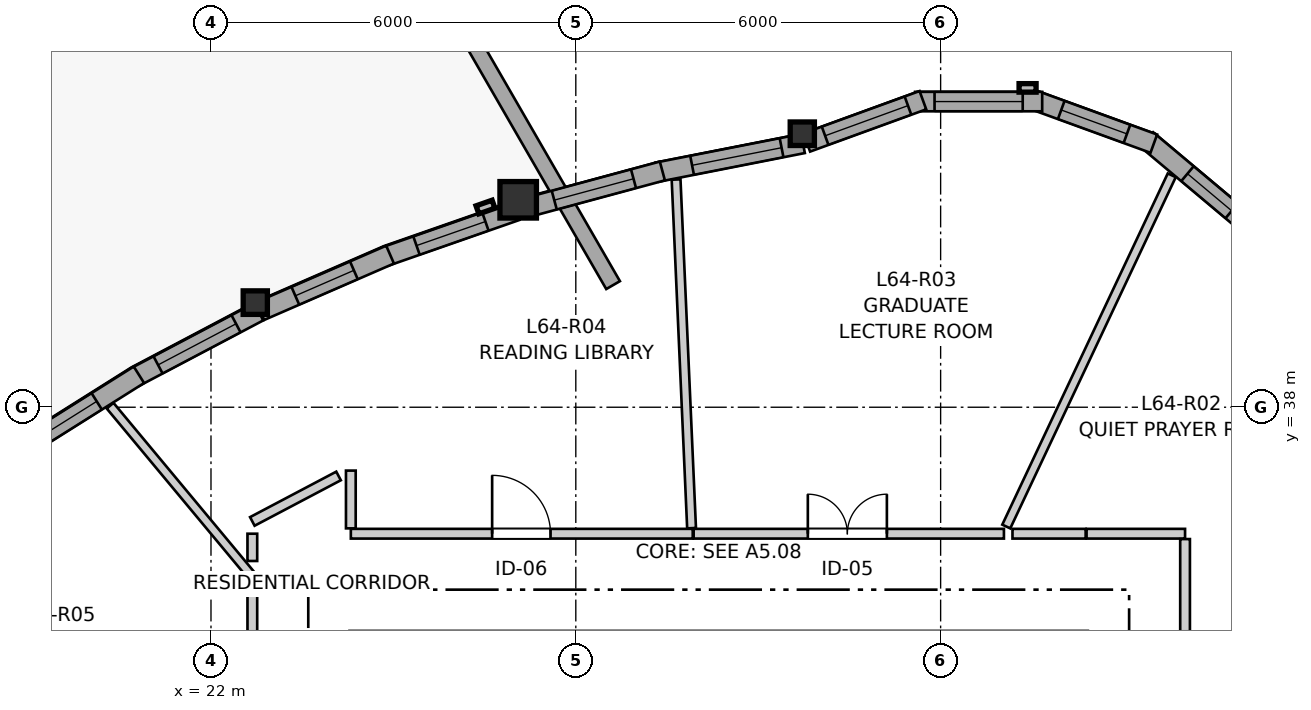
"""IFC4 building model, lengths in metres.
Left out: names, types, materials, properties, quantities, classifications, styles, units other than length and angle.
Written with IfcOpenShell. Run it as: python <this file> out.ifc"""

import sys

from ifc_helpers import new_model, si_unit, direction, frame, frame_2d, origin, origin_2d, place, context, subcontext, project, spatial, rectangle, i_section, extrude, source, transform, mapped, element, fill, save


model = new_model("IFC4")
c1 = context("Model", 3, precision=1e-05, world=origin(), true_north=direction((0.0, 1.0)))
c2 = subcontext(c1, "Body", "Model", "MODEL_VIEW")
j1 = project(units=[si_unit("LENGTHUNIT", "METRE"), si_unit("PLANEANGLEUNIT", "RADIAN")], contexts=[c1])
p1 = place(None, origin())
s1 = spatial("IfcSite", under=j1, at=p1, CompositionType="ELEMENT")
p2 = place(p1, origin())
s2 = spatial("IfcBuilding", under=s1, at=p2, CompositionType="ELEMENT")
p3 = place(p2, frame((0.0, 0.0, 214.8)))
s3 = spatial("IfcBuildingStorey", under=s2, at=p3, CompositionType="ELEMENT", Elevation=214.8)
m1 = source(origin(), c2, "Body", "SweptSolid", [
    extrude(i_section(OverallWidth=0.398, OverallDepth=0.387, WebThickness=0.019, FlangeThickness=0.03, FilletRadius=0.015, at=origin_2d()), origin(), (0.0, 0.0, 1.0), 2.96),
])
p4 = place(p3, frame((31.725, 42.498, 0.0), z_axis=(0.0, 0.0, 1.0), x_axis=(1.0, 0.0, 0.0)))
e1 = element("IfcColumn", 1, at=p4, inside=s3, PredefinedType="PILASTER", context=c2, shape_type="MappedRepresentation", body=[
    mapped(m1, transform((0.0, 0.0, 0.0), x_axis=(1.0, 0.0, 0.0), y_axis=(0.0, 1.0, 0.0), z_axis=(0.0, 0.0, 1.0), scale=1.0)),
])
m2 = source(origin(), c2, "Body", "SweptSolid", [
    extrude(rectangle(XDim=0.6, YDim=0.6, at=origin_2d()), origin(), (0.0, 0.0, 1.0), 2.96),
])
p5 = place(p3, frame((27.052, 41.411, 0.0), z_axis=(0.0, 0.0, 1.0), x_axis=(1.0, 0.0, 0.0)))
e2 = element("IfcColumn", 2, at=p5, inside=s3, PredefinedType="COLUMN", context=c2, shape_type="MappedRepresentation", body=[
    mapped(m2, transform((0.0, 0.0, 0.0), x_axis=(1.0, 0.0, 0.0), y_axis=(0.0, 1.0, 0.0), z_axis=(0.0, 0.0, 1.0), scale=1.0)),
])
p6 = place(p3, frame((22.729, 39.72, 0.0), z_axis=(0.0, 0.0, 1.0), x_axis=(1.0, 0.0, 0.0)))
e3 = element("IfcColumn", 3, at=p6, inside=s3, PredefinedType="PILASTER", context=c2, shape_type="MappedRepresentation", body=[
    mapped(m1, transform((0.0, 0.0, 0.0), x_axis=(1.0, 0.0, 0.0), y_axis=(0.0, 1.0, 0.0), z_axis=(0.0, 0.0, 1.0), scale=1.0)),
])
p7 = place(p3, frame((28.613, 40.008, 0.0), z_axis=(0.0, 0.0, 1.0), x_axis=(-0.49999213116, 0.866029946814, 0.0)))
e4 = element("IfcWall", 4, at=p7, inside=s3, PredefinedType="PARAPET", context=c2, shape_type="SweptSolid", body=[
    extrude(rectangle(XDim=20.349, YDim=0.26, at=frame_2d((10.174, 0.0))), origin(), (0.0, 0.0, 1.0), 0.55),
])
p8 = place(p3, frame((38.994, 41.056, 0.0), z_axis=(0.0, 0.0, 1.0), x_axis=(-0.766024572719, 0.642811289563, 0.0)))
e5 = element("IfcWall", 5, at=p8, inside=s3, PredefinedType="SOLIDWALL", context=c2, shape_type="SweptSolid", body=[
    extrude(rectangle(XDim=2.09, YDim=0.32, at=frame_2d((1.045, 0.0))), origin(), (0.0, 0.0, 1.0), 2.58),
])
p9 = place(p8, frame((0.271, 0.0, 0.82)))
e6 = element("IfcOpeningElement", 6, at=p9, cuts=e5, PredefinedType="OPENING", context=c2, shape_type="SweptSolid", body=[
    extrude(rectangle(XDim=0.95, YDim=1.35, at=frame_2d((0.475, 0.675))), frame((0.0, 0.17, 0.0), z_axis=(0.0, -1.0, 0.0), x_axis=(1.0, 0.0, 0.0)), (0.0, 0.0, 1.0), 0.34),
])
p10 = place(p3, frame((37.506, 42.334, 0.0), z_axis=(0.0, 0.0, 1.0), x_axis=(-0.939711556618, 0.341968113072, 0.0)))
e7 = element("IfcWall", 7, at=p10, inside=s3, PredefinedType="SOLIDWALL", context=c2, shape_type="SweptSolid", body=[
    extrude(rectangle(XDim=2.09, YDim=0.32, at=frame_2d((1.045, 0.0))), origin(), (0.0, 0.0, 1.0), 2.58),
])
p11 = place(p10, frame((0.47, 0.0, 0.82)))
e8 = element("IfcOpeningElement", 8, at=p11, cuts=e7, PredefinedType="OPENING", context=c2, shape_type="SweptSolid", body=[
    extrude(rectangle(XDim=1.15, YDim=1.2, at=frame_2d((0.575, 0.6))), frame((0.0, 0.17, 0.0), z_axis=(0.0, -1.0, 0.0), x_axis=(1.0, 0.0, 0.0)), (0.0, 0.0, 1.0), 0.34),
])
p12 = place(p3, frame((35.67, 43.027, 0.0), z_axis=(0.0, 0.0, 1.0), x_axis=(-1.0, 0.0, 0.0)))
e9 = element("IfcWall", 9, at=p12, inside=s3, PredefinedType="SOLIDWALL", context=c2, shape_type="SweptSolid", body=[
    extrude(rectangle(XDim=2.09, YDim=0.32, at=frame_2d((1.045, 0.0))), origin(), (0.0, 0.0, 1.0), 2.58),
])
p13 = place(p12, frame((0.32, 0.0, 0.82)))
e10 = element("IfcOpeningElement", 10, at=p13, cuts=e9, PredefinedType="OPENING", context=c2, shape_type="SweptSolid", body=[
    extrude(rectangle(XDim=1.45, YDim=1.25, at=frame_2d((0.725, 0.625))), frame((0.0, 0.17, 0.0), z_axis=(0.0, -1.0, 0.0), x_axis=(1.0, 0.0, 0.0)), (0.0, 0.0, 1.0), 0.34),
])
p14 = place(p3, frame((33.708, 43.049, 0.0), z_axis=(0.0, 0.0, 1.0), x_axis=(-0.939691662178, -0.342022777067, 0.0)))
e11 = element("IfcWall", 11, at=p14, inside=s3, PredefinedType="SOLIDWALL", context=c2, shape_type="SweptSolid", body=[
    extrude(rectangle(XDim=2.032, YDim=0.32, at=frame_2d((1.016, 0.0))), origin(), (0.0, 0.0, 1.0), 2.58),
])
p15 = place(p14, frame((0.261, 0.0, 0.82)))
e12 = element("IfcOpeningElement", 12, at=p15, cuts=e11, PredefinedType="OPENING", context=c2, shape_type="SweptSolid", body=[
    extrude(rectangle(XDim=1.45, YDim=1.25, at=frame_2d((0.725, 0.625))), frame((0.0, 0.17, 0.0), z_axis=(0.0, -1.0, 0.0), x_axis=(1.0, 0.0, 0.0)), (0.0, 0.0, 1.0), 0.34),
])
p16 = place(p3, frame((31.736, 42.337, 0.0), z_axis=(0.0, 0.0, 1.0), x_axis=(-0.981228566979, -0.192848384345, 0.0)))
e13 = element("IfcWall", 13, at=p16, inside=s3, PredefinedType="SOLIDWALL", context=c2, shape_type="SweptSolid", body=[
    extrude(rectangle(XDim=2.443, YDim=0.32, at=frame_2d((1.222, 0.0))), origin(), (0.0, 0.0, 1.0), 2.58),
])
p17 = place(p16, frame((0.359, 0.0, 0.82)))
e14 = element("IfcOpeningElement", 14, at=p17, cuts=e13, PredefinedType="OPENING", context=c2, shape_type="SweptSolid", body=[
    extrude(rectangle(XDim=1.5, YDim=1.45, at=frame_2d((0.75, 0.725))), frame((0.0, 0.17, 0.0), z_axis=(0.0, -1.0, 0.0), x_axis=(1.0, 0.0, 0.0)), (0.0, 0.0, 1.0), 0.34),
])
p18 = place(p3, frame((29.424, 41.885, 0.0), z_axis=(0.0, 0.0, 1.0), x_axis=(-0.965461343217, -0.260546338976, 0.0)))
e15 = element("IfcWall", 15, at=p18, inside=s3, PredefinedType="SOLIDWALL", context=c2, shape_type="SweptSolid", body=[
    extrude(rectangle(XDim=2.323, YDim=0.32, at=frame_2d((1.162, 0.0))), origin(), (0.0, 0.0, 1.0), 2.58),
])
p19 = place(p18, frame((0.491, 0.0, 0.82)))
e16 = element("IfcOpeningElement", 16, at=p19, cuts=e15, PredefinedType="OPENING", context=c2, shape_type="SweptSolid", body=[
    extrude(rectangle(XDim=1.35, YDim=1.45, at=frame_2d((0.675, 0.725))), frame((0.0, 0.17, 0.0), z_axis=(0.0, -1.0, 0.0), x_axis=(1.0, 0.0, 0.0)), (0.0, 0.0, 1.0), 0.34),
])
p20 = place(p3, frame((27.02, 41.23, 0.0), z_axis=(0.0, 0.0, 1.0), x_axis=(-0.944142960918, -0.329536142705, 0.0)))
e17 = element("IfcWall", 17, at=p20, inside=s3, PredefinedType="SOLIDWALL", context=c2, shape_type="SweptSolid", body=[
    extrude(rectangle(XDim=2.284, YDim=0.32, at=frame_2d((1.142, 0.0))), origin(), (0.0, 0.0, 1.0), 2.58),
])
p21 = place(p20, frame((0.537, 0.0, 0.82)))
e18 = element("IfcOpeningElement", 18, at=p21, cuts=e17, PredefinedType="OPENING", context=c2, shape_type="SweptSolid", body=[
    extrude(rectangle(XDim=1.2, YDim=1.45, at=frame_2d((0.6, 0.725))), frame((0.0, 0.17, 0.0), z_axis=(0.0, -1.0, 0.0), x_axis=(1.0, 0.0, 0.0)), (0.0, 0.0, 1.0), 0.34),
])
p22 = place(p3, frame((24.945, 40.51, 0.0), z_axis=(0.0, 0.0, 1.0), x_axis=(-0.917060051629, -0.39874912126, 0.0)))
e19 = element("IfcWall", 19, at=p22, inside=s3, PredefinedType="SOLIDWALL", context=c2, shape_type="SweptSolid", body=[
    extrude(rectangle(XDim=2.328, YDim=0.32, at=frame_2d((1.164, 0.0))), origin(), (0.0, 0.0, 1.0), 2.58),
])
p23 = place(p22, frame((0.649, 0.0, 0.82)))
e20 = element("IfcOpeningElement", 20, at=p23, cuts=e19, PredefinedType="OPENING", context=c2, shape_type="SweptSolid", body=[
    extrude(rectangle(XDim=1.05, YDim=1.45, at=frame_2d((0.525, 0.725))), frame((0.0, 0.17, 0.0), z_axis=(0.0, -1.0, 0.0), x_axis=(1.0, 0.0, 0.0)), (0.0, 0.0, 1.0), 0.34),
])
p24 = place(p3, frame((22.785, 39.57, 0.0), z_axis=(0.0, 0.0, 1.0), x_axis=(-0.884379914657, -0.466767786541, 0.0)))
e21 = element("IfcWall", 21, at=p24, inside=s3, PredefinedType="SOLIDWALL", context=c2, shape_type="SweptSolid", body=[
    extrude(rectangle(XDim=2.314, YDim=0.32, at=frame_2d((1.157, 0.0))), origin(), (0.0, 0.0, 1.0), 2.58),
])
p25 = place(p24, frame((0.422, 0.0, 0.82)))
e22 = element("IfcOpeningElement", 22, at=p25, cuts=e21, PredefinedType="OPENING", context=c2, shape_type="SweptSolid", body=[
    extrude(rectangle(XDim=1.45, YDim=1.25, at=frame_2d((0.725, 0.625))), frame((0.0, 0.17, 0.0), z_axis=(0.0, -1.0, 0.0), x_axis=(1.0, 0.0, 0.0)), (0.0, 0.0, 1.0), 0.34),
])
p26 = place(p3, frame((20.815, 38.533, 0.0), z_axis=(0.0, 0.0, 1.0), x_axis=(-0.846418054627, -0.532518991963, 0.0)))
e23 = element("IfcWall", 23, at=p26, inside=s3, PredefinedType="SOLIDWALL", context=c2, shape_type="SweptSolid", body=[
    extrude(rectangle(XDim=2.245, YDim=0.32, at=frame_2d((1.122, 0.0))), origin(), (0.0, 0.0, 1.0), 2.58),
])
p27 = place(p26, frame((0.82, 0.0, 0.82)))
e24 = element("IfcOpeningElement", 24, at=p27, cuts=e23, PredefinedType="OPENING", context=c2, shape_type="SweptSolid", body=[
    extrude(rectangle(XDim=1.05, YDim=1.45, at=frame_2d((0.525, 0.725))), frame((0.0, 0.17, 0.0), z_axis=(0.0, -1.0, 0.0), x_axis=(1.0, 0.0, 0.0)), (0.0, 0.0, 1.0), 0.34),
])
p28 = place(p3, frame((24.3, 35.92, 0.0), z_axis=(0.0, 0.0, 1.0), x_axis=(1.0, 0.0, 0.0)))
e25 = element("IfcWall", 25, at=p28, inside=s3, PredefinedType="PARTITIONING", context=c2, shape_type="SweptSolid", body=[
    extrude(rectangle(XDim=5.623, YDim=0.16, at=frame_2d((2.812, 0.0))), origin(), (0.0, 0.0, 1.0), 2.96),
])
p29 = place(p28, frame((2.324, 0.0, 0.0)))
e26 = element("IfcOpeningElement", 26, at=p29, cuts=e25, PredefinedType="OPENING", context=c2, shape_type="SweptSolid", body=[
    extrude(rectangle(XDim=0.96, YDim=2.1, at=frame_2d((0.48, 1.05))), frame((0.0, 0.09, 0.0), z_axis=(0.0, -1.0, 0.0), x_axis=(1.0, 0.0, 0.0)), (0.0, 0.0, 1.0), 0.18),
])
p30 = place(p3, frame((29.938, 35.92, 0.0), z_axis=(0.0, 0.0, 1.0), x_axis=(1.0, 0.0, 0.0)))
e27 = element("IfcWall", 27, at=p30, inside=s3, PredefinedType="PARTITIONING", context=c2, shape_type="SweptSolid", body=[
    extrude(rectangle(XDim=5.103, YDim=0.16, at=frame_2d((2.552, 0.0))), origin(), (0.0, 0.0, 1.0), 2.628),
])
p31 = place(p30, frame((1.878, 0.0, 0.0)))
e28 = element("IfcOpeningElement", 28, at=p31, cuts=e27, PredefinedType="OPENING", context=c2, shape_type="SweptSolid", body=[
    extrude(rectangle(XDim=1.3, YDim=2.1, at=frame_2d((0.65, 1.05))), frame((0.0, 0.09, 0.0), z_axis=(0.0, -1.0, 0.0), x_axis=(1.0, 0.0, 0.0)), (0.0, 0.0, 1.0), 0.18),
])
p32 = place(p3, frame((35.08, 36.038, 0.0), z_axis=(0.0, 0.0, 1.0), x_axis=(0.426214985607, 0.904621902258, 0.0)))
e29 = element("IfcWall", 29, at=p32, inside=s3, PredefinedType="PARTITIONING", context=c2, shape_type="SweptSolid", body=[
    extrude(rectangle(XDim=6.385, YDim=0.145, at=frame_2d((3.192, 0.0))), origin(), (0.0, 0.0, 1.0), 2.96),
])
p33 = place(p3, frame((29.649, 41.745, 0.0), z_axis=(0.0, 0.0, 1.0), x_axis=(0.044327022296, -0.999017074476, 0.0)))
e30 = element("IfcWall", 30, at=p33, inside=s3, PredefinedType="PARTITIONING", context=c2, shape_type="SweptSolid", body=[
    extrude(rectangle(XDim=5.739, YDim=0.145, at=frame_2d((2.87, 0.0))), origin(), (0.0, 0.0, 1.0), 2.96),
])
p34 = place(p3, frame((20.341, 38.025, 0.0), z_axis=(0.0, 0.0, 1.0), x_axis=(0.639731122463, -0.768598784121, 0.0)))
e31 = element("IfcWall", 31, at=p34, inside=s3, PredefinedType="PARTITIONING", context=c2, shape_type="SweptSolid", body=[
    extrude(rectangle(XDim=3.656, YDim=0.145, at=frame_2d((1.828, 0.0))), origin(), (0.0, 0.0, 1.0), 2.96),
])
p35 = place(p3, frame((36.4, 35.92, 0.0), z_axis=(0.0, 0.0, 1.0), x_axis=(1.0, 0.0, 0.0)))
e32 = element("IfcWall", 32, at=p35, inside=s3, PredefinedType="PARTITIONING", context=c2, shape_type="SweptSolid", body=[
    extrude(rectangle(XDim=1.62, YDim=0.16, at=frame_2d((0.81, 0.0))), origin(), (0.0, 0.0, 1.0), 2.96),
])
p36 = place(p3, frame((38.02, 34.315, 0.0), z_axis=(0.0, 0.0, 1.0), x_axis=(0.0, 1.0, 0.0)))
e33 = element("IfcWall", 33, at=p36, inside=s3, PredefinedType="PARTITIONING", context=c2, shape_type="SweptSolid", body=[
    extrude(rectangle(XDim=1.517, YDim=0.16, at=frame_2d((0.759, 0.0))), origin(), (0.0, 0.0, 1.0), 2.628),
])
p37 = place(p3, frame((22.68, 36.122, 0.0), z_axis=(0.0, 0.0, 1.0), x_axis=(0.884468554818, 0.466599802335, 0.0)))
e34 = element("IfcWall", 34, at=p37, inside=s3, PredefinedType="PARTITIONING", context=c2, shape_type="SweptSolid", body=[
    extrude(rectangle(XDim=1.603, YDim=0.16, at=frame_2d((0.802, 0.0))), origin(), (0.0, 0.0, 1.0), 2.96),
])
p38 = place(p3, frame((35.182, 35.92, 0.0), z_axis=(0.0, 0.0, 1.0), x_axis=(1.0, 0.0, 0.0)))
e35 = element("IfcWall", 35, at=p38, inside=s3, PredefinedType="PARTITIONING", context=c2, shape_type="SweptSolid", body=[
    extrude(rectangle(XDim=1.203, YDim=0.16, at=frame_2d((0.602, 0.0))), origin(), (0.0, 0.0, 1.0), 2.96),
])
p39 = place(p3, frame((24.3, 36.008, 0.0), z_axis=(0.0, 0.0, 1.0), x_axis=(0.0, 1.0, 0.0)))
e36 = element("IfcWall", 36, at=p39, inside=s3, PredefinedType="PARTITIONING", context=c2, shape_type="SweptSolid", body=[
    extrude(rectangle(XDim=0.95, YDim=0.16, at=frame_2d((0.475, 0.0))), origin(), (0.0, 0.0, 1.0), 2.96),
])
p40 = place(p3, frame((22.68, 34.315, 0.0), z_axis=(0.0, 0.0, 1.0), x_axis=(0.0, 1.0, 0.0)))
e37 = element("IfcWall", 37, at=p40, inside=s3, PredefinedType="PARTITIONING", context=c2, shape_type="SweptSolid", body=[
    extrude(rectangle(XDim=0.707, YDim=0.16, at=frame_2d((0.353, 0.0))), origin(), (0.0, 0.0, 1.0), 2.96),
])
p41 = place(p3, frame((22.68, 35.471, 0.0), z_axis=(0.0, 0.0, 1.0), x_axis=(0.0, 1.0, 0.0)))
e38 = element("IfcWall", 38, at=p41, inside=s3, PredefinedType="PARTITIONING", context=c2, shape_type="SweptSolid", body=[
    extrude(rectangle(XDim=0.448, YDim=0.16, at=frame_2d((0.224, 0.0))), origin(), (0.0, 0.0, 1.0), 2.96),
])
m3 = source(origin(), c2, "Body", "SweptSolid", [
    extrude(rectangle(XDim=0.95, YDim=1.35, at=frame_2d((0.475, 0.675))), frame((0.0, 0.03, 0.0), z_axis=(0.0, -1.0, 0.0), x_axis=(1.0, 0.0, 0.0)), (0.0, 0.0, 1.0), 0.06),
])
p42 = place(p9, origin())
e39 = element("IfcWindow", 39, at=p42, inside=s3, PartitioningType="SINGLE_PANEL", PredefinedType="WINDOW", context=c2, shape_type="MappedRepresentation", body=[
    mapped(m3, transform((0.0, 0.0, 0.0), x_axis=(1.0, 0.0, 0.0), y_axis=(0.0, 1.0, 0.0), z_axis=(0.0, 0.0, 1.0), scale=1.0)),
])
fill(e6, e39)
m4 = source(origin(), c2, "Body", "SweptSolid", [
    extrude(rectangle(XDim=1.15, YDim=1.2, at=frame_2d((0.575, 0.6))), frame((0.0, 0.03, 0.0), z_axis=(0.0, -1.0, 0.0), x_axis=(1.0, 0.0, 0.0)), (0.0, 0.0, 1.0), 0.06),
])
p43 = place(p11, origin())
e40 = element("IfcWindow", 40, at=p43, inside=s3, PartitioningType="SINGLE_PANEL", PredefinedType="WINDOW", context=c2, shape_type="MappedRepresentation", body=[
    mapped(m4, transform((0.0, 0.0, 0.0), x_axis=(1.0, 0.0, 0.0), y_axis=(0.0, 1.0, 0.0), z_axis=(0.0, 0.0, 1.0), scale=1.0)),
])
fill(e8, e40)
m5 = source(origin(), c2, "Body", "SweptSolid", [
    extrude(rectangle(XDim=1.45, YDim=1.25, at=frame_2d((0.725, 0.625))), frame((0.0, 0.03, 0.0), z_axis=(0.0, -1.0, 0.0), x_axis=(1.0, 0.0, 0.0)), (0.0, 0.0, 1.0), 0.06),
])
p44 = place(p13, origin())
e41 = element("IfcWindow", 41, at=p44, inside=s3, PartitioningType="SINGLE_PANEL", PredefinedType="WINDOW", context=c2, shape_type="MappedRepresentation", body=[
    mapped(m5, transform((0.0, 0.0, 0.0), x_axis=(1.0, 0.0, 0.0), y_axis=(0.0, 1.0, 0.0), z_axis=(0.0, 0.0, 1.0), scale=1.0)),
])
fill(e10, e41)
p45 = place(p15, origin())
e42 = element("IfcWindow", 42, at=p45, inside=s3, PartitioningType="SINGLE_PANEL", PredefinedType="WINDOW", context=c2, shape_type="MappedRepresentation", body=[
    mapped(m5, transform((0.0, 0.0, 0.0), x_axis=(1.0, 0.0, 0.0), y_axis=(0.0, 1.0, 0.0), z_axis=(0.0, 0.0, 1.0), scale=1.0)),
])
fill(e12, e42)
m6 = source(origin(), c2, "Body", "SweptSolid", [
    extrude(rectangle(XDim=1.5, YDim=1.45, at=frame_2d((0.75, 0.725))), frame((0.0, 0.03, 0.0), z_axis=(0.0, -1.0, 0.0), x_axis=(1.0, 0.0, 0.0)), (0.0, 0.0, 1.0), 0.06),
])
p46 = place(p17, origin())
e43 = element("IfcWindow", 43, at=p46, inside=s3, PartitioningType="SINGLE_PANEL", PredefinedType="WINDOW", context=c2, shape_type="MappedRepresentation", body=[
    mapped(m6, transform((0.0, 0.0, 0.0), x_axis=(1.0, 0.0, 0.0), y_axis=(0.0, 1.0, 0.0), z_axis=(0.0, 0.0, 1.0), scale=1.0)),
])
fill(e14, e43)
m7 = source(origin(), c2, "Body", "SweptSolid", [
    extrude(rectangle(XDim=1.35, YDim=1.45, at=frame_2d((0.675, 0.725))), frame((0.0, 0.03, 0.0), z_axis=(0.0, -1.0, 0.0), x_axis=(1.0, 0.0, 0.0)), (0.0, 0.0, 1.0), 0.06),
])
p47 = place(p19, origin())
e44 = element("IfcWindow", 44, at=p47, inside=s3, PartitioningType="SINGLE_PANEL", PredefinedType="WINDOW", context=c2, shape_type="MappedRepresentation", body=[
    mapped(m7, transform((0.0, 0.0, 0.0), x_axis=(1.0, 0.0, 0.0), y_axis=(0.0, 1.0, 0.0), z_axis=(0.0, 0.0, 1.0), scale=1.0)),
])
fill(e16, e44)
m8 = source(origin(), c2, "Body", "SweptSolid", [
    extrude(rectangle(XDim=1.2, YDim=1.45, at=frame_2d((0.6, 0.725))), frame((0.0, 0.03, 0.0), z_axis=(0.0, -1.0, 0.0), x_axis=(1.0, 0.0, 0.0)), (0.0, 0.0, 1.0), 0.06),
])
p48 = place(p21, origin())
e45 = element("IfcWindow", 45, at=p48, inside=s3, PartitioningType="SINGLE_PANEL", PredefinedType="WINDOW", context=c2, shape_type="MappedRepresentation", body=[
    mapped(m8, transform((0.0, 0.0, 0.0), x_axis=(1.0, 0.0, 0.0), y_axis=(0.0, 1.0, 0.0), z_axis=(0.0, 0.0, 1.0), scale=1.0)),
])
fill(e18, e45)
m9 = source(origin(), c2, "Body", "SweptSolid", [
    extrude(rectangle(XDim=1.05, YDim=1.45, at=frame_2d((0.525, 0.725))), frame((0.0, 0.03, 0.0), z_axis=(0.0, -1.0, 0.0), x_axis=(1.0, 0.0, 0.0)), (0.0, 0.0, 1.0), 0.06),
])
p49 = place(p23, origin())
e46 = element("IfcWindow", 46, at=p49, inside=s3, PartitioningType="SINGLE_PANEL", PredefinedType="WINDOW", context=c2, shape_type="MappedRepresentation", body=[
    mapped(m9, transform((0.0, 0.0, 0.0), x_axis=(1.0, 0.0, 0.0), y_axis=(0.0, 1.0, 0.0), z_axis=(0.0, 0.0, 1.0), scale=1.0)),
])
fill(e20, e46)
p50 = place(p25, origin())
e47 = element("IfcWindow", 47, at=p50, inside=s3, PartitioningType="SINGLE_PANEL", PredefinedType="WINDOW", context=c2, shape_type="MappedRepresentation", body=[
    mapped(m5, transform((0.0, 0.0, 0.0), x_axis=(1.0, 0.0, 0.0), y_axis=(0.0, 1.0, 0.0), z_axis=(0.0, 0.0, 1.0), scale=1.0)),
])
fill(e22, e47)
p51 = place(p27, origin())
e48 = element("IfcWindow", 48, at=p51, inside=s3, PartitioningType="SINGLE_PANEL", PredefinedType="WINDOW", context=c2, shape_type="MappedRepresentation", body=[
    mapped(m9, transform((0.0, 0.0, 0.0), x_axis=(1.0, 0.0, 0.0), y_axis=(0.0, 1.0, 0.0), z_axis=(0.0, 0.0, 1.0), scale=1.0)),
])
fill(e24, e48)
m10 = source(origin(), c2, "Body", "SweptSolid", [
    extrude(rectangle(XDim=0.96, YDim=2.1, at=frame_2d((0.48, 1.05))), frame((0.0, 0.025, 0.0), z_axis=(0.0, -1.0, 0.0), x_axis=(1.0, 0.0, 0.0)), (0.0, 0.0, 1.0), 0.05),
])
p52 = place(p29, origin())
e49 = element("IfcDoor", 49, at=p52, inside=s3, OperationType="SINGLE_SWING_LEFT", PredefinedType="DOOR", context=c2, shape_type="MappedRepresentation", body=[
    mapped(m10, transform((0.0, 0.0, 0.0), x_axis=(1.0, 0.0, 0.0), y_axis=(0.0, 1.0, 0.0), z_axis=(0.0, 0.0, 1.0), scale=1.0)),
])
fill(e26, e49)
m11 = source(origin(), c2, "Body", "SweptSolid", [
    extrude(rectangle(XDim=1.3, YDim=2.1, at=frame_2d((0.65, 1.05))), frame((0.0, 0.025, 0.0), z_axis=(0.0, -1.0, 0.0), x_axis=(1.0, 0.0, 0.0)), (0.0, 0.0, 1.0), 0.05),
])
p53 = place(p31, origin())
e50 = element("IfcDoor", 50, at=p53, inside=s3, OperationType="DOUBLE_DOOR_SINGLE_SWING", PredefinedType="DOOR", context=c2, shape_type="MappedRepresentation", body=[
    mapped(m11, transform((0.0, 0.0, 0.0), x_axis=(1.0, 0.0, 0.0), y_axis=(0.0, 1.0, 0.0), z_axis=(0.0, 0.0, 1.0), scale=1.0)),
])
fill(e28, e50)
save(model, sys.argv[1])
